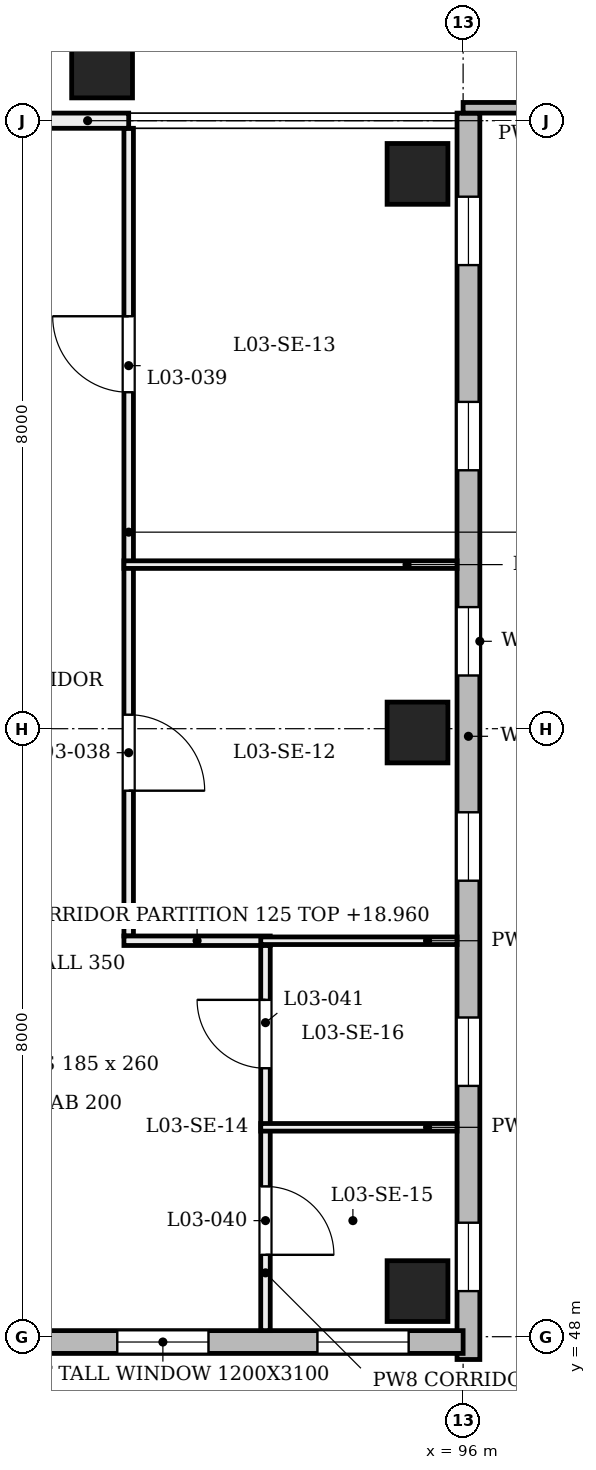
"""IFC4 building model, lengths in metres.
Left out: names, types, materials, properties, quantities, classifications, styles, units other than length and angle.
Written with IfcOpenShell. Run it as: python <this file> out.ifc"""

import sys

from ifc_helpers import new_model, si_unit, direction, frame, frame_2d, origin, origin_2d, place, context, subcontext, project, spatial, rectangle, extrude, element, fill, save


model = new_model("IFC4")
c1 = context("Model", 3, precision=1e-05, world=origin(), true_north=direction((0.0, 1.0)))
c2 = subcontext(c1, "Body", "Model", "MODEL_VIEW")
j1 = project(units=[si_unit("LENGTHUNIT", "METRE"), si_unit("PLANEANGLEUNIT", "RADIAN")], contexts=[c1])
p1 = place(None, origin())
s1 = spatial("IfcSite", under=j1, at=p1, CompositionType="ELEMENT")
p2 = place(p1, origin())
s2 = spatial("IfcBuilding", under=s1, at=p2, CompositionType="ELEMENT")
p3 = place(p2, frame((0.0, 0.0, 14.4)))
s3 = spatial("IfcBuildingStorey", under=s2, at=p3, CompositionType="ELEMENT", Elevation=14.4)
for number, where, z_axis, x_axis in (
    (1, (95.4, 48.6, 0.0), (0.0, 0.0, 1.0), (1.0, 0.0, 0.0)),
    (2, (95.4, 55.95, 0.0), (0.0, 0.0, 1.0), (1.0, 0.0, 0.0)),
    (3, (95.4, 63.3, 0.0), (0.0, 0.0, 1.0), (1.0, 0.0, 0.0)),
):
    element("IfcColumn", number, at=place(p3, frame(where, z_axis=z_axis, x_axis=x_axis)), inside=s3, PredefinedType="COLUMN", context=c2, shape_type="SweptSolid", body=[
        extrude(rectangle(XDim=0.8, YDim=0.8, at=origin_2d()), origin(), (0.0, 0.0, 1.0), 4.8),
    ])
p4 = place(p3, frame((91.0, 64.7, 0.0), z_axis=(0.203952265704, 0.0, 0.978980833987), x_axis=(0.0, 1.0, 0.0)))
e4 = element("IfcColumn", 4, at=p4, inside=s3, PredefinedType="COLUMN", context=c2, shape_type="SweptSolid", body=[
    extrude(rectangle(XDim=0.8, YDim=0.8, at=origin_2d()), origin(), (0.0, 0.0, 1.0), 4.903),
])
p5 = place(p3, frame((96.07, 47.7, 0.0), z_axis=(0.0, 0.0, 1.0), x_axis=(0.0, 1.0, 0.0)))
e5 = element("IfcWall", 5, at=p5, inside=s3, PredefinedType="SOLIDWALL", context=c2, shape_type="SweptSolid", body=[
    extrude(rectangle(XDim=16.4, YDim=0.3, at=frame_2d((8.2, 0.0))), origin(), (0.0, 0.0, 1.0), 3.9),
])
p6 = place(p5, frame((0.9, 0.0, 0.75)))
e6 = element("IfcOpeningElement", 6, at=p6, cuts=e5, PredefinedType="OPENING", context=c2, shape_type="SweptSolid", body=[
    extrude(rectangle(XDim=0.9, YDim=3.1, at=frame_2d((0.45, 1.55))), frame((0.0, 0.16, 0.0), z_axis=(0.0, -1.0, 0.0), x_axis=(1.0, 0.0, 0.0)), (0.0, 0.0, 1.0), 0.32),
])
p7 = place(p5, frame((3.6, 0.0, 0.75)))
e7 = element("IfcOpeningElement", 7, at=p7, cuts=e5, PredefinedType="OPENING", context=c2, shape_type="SweptSolid", body=[
    extrude(rectangle(XDim=0.9, YDim=3.1, at=frame_2d((0.45, 1.55))), frame((0.0, 0.16, 0.0), z_axis=(0.0, -1.0, 0.0), x_axis=(1.0, 0.0, 0.0)), (0.0, 0.0, 1.0), 0.32),
])
p8 = place(p5, frame((6.3, 0.0, 0.75)))
e8 = element("IfcOpeningElement", 8, at=p8, cuts=e5, PredefinedType="OPENING", context=c2, shape_type="SweptSolid", body=[
    extrude(rectangle(XDim=0.9, YDim=3.1, at=frame_2d((0.45, 1.55))), frame((0.0, 0.16, 0.0), z_axis=(0.0, -1.0, 0.0), x_axis=(1.0, 0.0, 0.0)), (0.0, 0.0, 1.0), 0.32),
])
p9 = place(p5, frame((9.0, 0.0, 0.75)))
e9 = element("IfcOpeningElement", 9, at=p9, cuts=e5, PredefinedType="OPENING", context=c2, shape_type="SweptSolid", body=[
    extrude(rectangle(XDim=0.9, YDim=3.1, at=frame_2d((0.45, 1.55))), frame((0.0, 0.16, 0.0), z_axis=(0.0, -1.0, 0.0), x_axis=(1.0, 0.0, 0.0)), (0.0, 0.0, 1.0), 0.32),
])
p10 = place(p5, frame((11.7, 0.0, 0.75)))
e10 = element("IfcOpeningElement", 10, at=p10, cuts=e5, PredefinedType="OPENING", context=c2, shape_type="SweptSolid", body=[
    extrude(rectangle(XDim=0.9, YDim=3.1, at=frame_2d((0.45, 1.55))), frame((0.0, 0.16, 0.0), z_axis=(0.0, -1.0, 0.0), x_axis=(1.0, 0.0, 0.0)), (0.0, 0.0, 1.0), 0.32),
])
p11 = place(p5, frame((14.4, 0.0, 0.75)))
e11 = element("IfcOpeningElement", 11, at=p11, cuts=e5, PredefinedType="OPENING", context=c2, shape_type="SweptSolid", body=[
    extrude(rectangle(XDim=0.9, YDim=3.1, at=frame_2d((0.45, 1.55))), frame((0.0, 0.16, 0.0), z_axis=(0.0, -1.0, 0.0), x_axis=(1.0, 0.0, 0.0)), (0.0, 0.0, 1.0), 0.32),
])
p12 = place(p3, frame((88.1, 47.93, 0.0), z_axis=(0.0, 0.0, 1.0), x_axis=(1.0, 0.0, 0.0)))
e12 = element("IfcWall", 12, at=p12, inside=s3, PredefinedType="SOLIDWALL", context=c2, shape_type="SweptSolid", body=[
    extrude(rectangle(XDim=7.9, YDim=0.3, at=frame_2d((3.95, 0.0))), origin(), (0.0, 0.0, 1.0), 3.9),
])
p13 = place(p12, frame((0.717, 0.0, 0.75)))
e13 = element("IfcOpeningElement", 13, at=p13, cuts=e12, PredefinedType="OPENING", context=c2, shape_type="SweptSolid", body=[
    extrude(rectangle(XDim=1.2, YDim=3.1, at=frame_2d((0.6, 1.55))), frame((0.0, 0.16, 0.0), z_axis=(0.0, -1.0, 0.0), x_axis=(1.0, 0.0, 0.0)), (0.0, 0.0, 1.0), 0.32),
])
p14 = place(p12, frame((3.35, 0.0, 0.75)))
e14 = element("IfcOpeningElement", 14, at=p14, cuts=e12, PredefinedType="OPENING", context=c2, shape_type="SweptSolid", body=[
    extrude(rectangle(XDim=1.2, YDim=3.1, at=frame_2d((0.6, 1.55))), frame((0.0, 0.16, 0.0), z_axis=(0.0, -1.0, 0.0), x_axis=(1.0, 0.0, 0.0)), (0.0, 0.0, 1.0), 0.32),
])
p15 = place(p12, frame((5.983, 0.0, 0.75)))
e15 = element("IfcOpeningElement", 15, at=p15, cuts=e12, PredefinedType="OPENING", context=c2, shape_type="SweptSolid", body=[
    extrude(rectangle(XDim=1.2, YDim=3.1, at=frame_2d((0.6, 1.55))), frame((0.0, 0.16, 0.0), z_axis=(0.0, -1.0, 0.0), x_axis=(1.0, 0.0, 0.0)), (0.0, 0.0, 1.0), 0.32),
])
p16 = place(p3, frame((96.0, 64.17, 0.0), z_axis=(0.0, 0.0, 1.0), x_axis=(1.0, 0.0, 0.0)))
e16 = element("IfcWall", 16, at=p16, inside=s3, PredefinedType="SOLIDWALL", context=c2, shape_type="SweptSolid", body=[
    extrude(rectangle(XDim=3.0, YDim=0.14, at=frame_2d((1.5, 0.0))), origin(), (0.0, 0.0, 1.0), 3.9),
])
p17 = place(p3, frame((91.6, 53.272, 0.0), z_axis=(0.0, 0.0, 1.0), x_axis=(0.0, 1.0, 0.0)))
e17 = element("IfcWall", 17, at=p17, inside=s3, PredefinedType="PARTITIONING", context=c2, shape_type="SweptSolid", body=[
    extrude(rectangle(XDim=10.628, YDim=0.125, at=frame_2d((5.314, 0.0))), origin(), (0.0, 0.0, 1.0), 3.88),
])
p18 = place(p17, frame((1.912, 0.0, 0.0)))
e18 = element("IfcOpeningElement", 18, at=p18, cuts=e17, PredefinedType="OPENING", context=c2, shape_type="SweptSolid", body=[
    extrude(rectangle(XDim=1.0, YDim=2.1, at=frame_2d((0.5, 1.05))), frame((0.0, 0.073, 0.0), z_axis=(0.0, -1.0, 0.0), x_axis=(1.0, 0.0, 0.0)), (0.0, 0.0, 1.0), 0.145),
])
p19 = place(p17, frame((7.155, 0.0, 0.0)))
e19 = element("IfcOpeningElement", 19, at=p19, cuts=e17, PredefinedType="OPENING", context=c2, shape_type="SweptSolid", body=[
    extrude(rectangle(XDim=1.0, YDim=2.1, at=frame_2d((0.5, 1.05))), frame((0.0, 0.073, 0.0), z_axis=(0.0, -1.0, 0.0), x_axis=(1.0, 0.0, 0.0)), (0.0, 0.0, 1.0), 0.145),
])
p20 = place(p3, frame((91.538, 53.21, 0.0), z_axis=(0.0, 0.0, 1.0), x_axis=(1.0, 0.0, 0.0)))
e20 = element("IfcWall", 20, at=p20, inside=s3, PredefinedType="PARTITIONING", context=c2, shape_type="SweptSolid", body=[
    extrude(rectangle(XDim=1.925, YDim=0.125, at=frame_2d((0.962, 0.0))), origin(), (0.0, 0.0, 1.0), 4.56),
])
p21 = place(p3, frame((93.337, 53.21, 0.0), z_axis=(0.0, 0.0, 1.0), x_axis=(1.0, 0.0, 0.0)))
e21 = element("IfcWall", 21, at=p21, inside=s3, PredefinedType="PARTITIONING", context=c2, shape_type="SweptSolid", body=[
    extrude(rectangle(XDim=2.583, YDim=0.1, at=frame_2d((1.291, 0.0))), origin(), (0.0, 0.0, 1.0), 3.88),
])
p22 = place(p3, frame((91.538, 58.159, 0.0), z_axis=(0.0, 0.0, 1.0), x_axis=(1.0, 0.0, 0.0)))
e22 = element("IfcWall", 22, at=p22, inside=s3, PredefinedType="PARTITIONING", context=c2, shape_type="SweptSolid", body=[
    extrude(rectangle(XDim=4.382, YDim=0.1, at=frame_2d((2.191, 0.0))), origin(), (0.0, 0.0, 1.0), 3.88),
])
p23 = place(p3, frame((93.4, 48.08, 0.0), z_axis=(0.0, 0.0, 1.0), x_axis=(0.0, 1.0, 0.0)))
e23 = element("IfcWall", 23, at=p23, inside=s3, PredefinedType="PARTITIONING", context=c2, shape_type="SweptSolid", body=[
    extrude(rectangle(XDim=5.067, YDim=0.125, at=frame_2d((2.534, 0.0))), origin(), (0.0, 0.0, 1.0), 3.88),
])
p24 = place(p23, frame((0.997, 0.0, 0.0)))
e24 = element("IfcOpeningElement", 24, at=p24, cuts=e23, PredefinedType="OPENING", context=c2, shape_type="SweptSolid", body=[
    extrude(rectangle(XDim=0.9, YDim=2.1, at=frame_2d((0.45, 1.05))), frame((0.0, 0.073, 0.0), z_axis=(0.0, -1.0, 0.0), x_axis=(1.0, 0.0, 0.0)), (0.0, 0.0, 1.0), 0.145),
])
p25 = place(p23, frame((3.452, 0.0, 0.0)))
e25 = element("IfcOpeningElement", 25, at=p25, cuts=e23, PredefinedType="OPENING", context=c2, shape_type="SweptSolid", body=[
    extrude(rectangle(XDim=0.9, YDim=2.1, at=frame_2d((0.45, 1.05))), frame((0.0, 0.073, 0.0), z_axis=(0.0, -1.0, 0.0), x_axis=(1.0, 0.0, 0.0)), (0.0, 0.0, 1.0), 0.145),
])
p26 = place(p3, frame((93.337, 50.755, 0.0), z_axis=(0.0, 0.0, 1.0), x_axis=(1.0, 0.0, 0.0)))
e26 = element("IfcWall", 26, at=p26, inside=s3, PredefinedType="PARTITIONING", context=c2, shape_type="SweptSolid", body=[
    extrude(rectangle(XDim=2.583, YDim=0.1, at=frame_2d((1.291, 0.0))), origin(), (0.0, 0.0, 1.0), 3.88),
])
p27 = place(p3, frame((88.0, 64.0, 0.0), z_axis=(0.0, 0.0, 1.0), x_axis=(1.0, 0.0, 0.0)))
e27 = element("IfcWall", 27, at=p27, inside=s3, PredefinedType="PARTITIONING", context=c2, shape_type="SweptSolid", body=[
    extrude(rectangle(XDim=3.6, YDim=0.2, at=frame_2d((1.8, 0.0))), origin(), (0.0, 0.0, 1.0), 3.88),
])
p28 = place(p27, frame((1.3, 0.0, 0.0)))
e28 = element("IfcOpeningElement", 28, at=p28, cuts=e27, PredefinedType="OPENING", context=c2, shape_type="SweptSolid", body=[
    extrude(rectangle(XDim=1.0, YDim=2.1, at=frame_2d((0.5, 1.05))), frame((0.0, 0.11, 0.0), z_axis=(0.0, -1.0, 0.0), x_axis=(1.0, 0.0, 0.0)), (0.0, 0.0, 1.0), 0.22),
])
p29 = place(p6, origin())
e29 = element("IfcWindow", 29, at=p29, inside=s3, PartitioningType="SINGLE_PANEL", PredefinedType="WINDOW", context=c2, shape_type="SweptSolid", body=[
    extrude(rectangle(XDim=0.9, YDim=3.1, at=frame_2d((0.45, 1.55))), frame((0.0, 0.03, 0.0), z_axis=(0.0, -1.0, 0.0), x_axis=(1.0, 0.0, 0.0)), (0.0, 0.0, 1.0), 0.06),
])
fill(e6, e29)
p30 = place(p7, origin())
e30 = element("IfcWindow", 30, at=p30, inside=s3, PartitioningType="SINGLE_PANEL", PredefinedType="WINDOW", context=c2, shape_type="SweptSolid", body=[
    extrude(rectangle(XDim=0.9, YDim=3.1, at=frame_2d((0.45, 1.55))), frame((0.0, 0.03, 0.0), z_axis=(0.0, -1.0, 0.0), x_axis=(1.0, 0.0, 0.0)), (0.0, 0.0, 1.0), 0.06),
])
fill(e7, e30)
p31 = place(p8, origin())
e31 = element("IfcWindow", 31, at=p31, inside=s3, PartitioningType="SINGLE_PANEL", PredefinedType="WINDOW", context=c2, shape_type="SweptSolid", body=[
    extrude(rectangle(XDim=0.9, YDim=3.1, at=frame_2d((0.45, 1.55))), frame((0.0, 0.03, 0.0), z_axis=(0.0, -1.0, 0.0), x_axis=(1.0, 0.0, 0.0)), (0.0, 0.0, 1.0), 0.06),
])
fill(e8, e31)
p32 = place(p9, origin())
e32 = element("IfcWindow", 32, at=p32, inside=s3, PartitioningType="SINGLE_PANEL", PredefinedType="WINDOW", context=c2, shape_type="SweptSolid", body=[
    extrude(rectangle(XDim=0.9, YDim=3.1, at=frame_2d((0.45, 1.55))), frame((0.0, 0.03, 0.0), z_axis=(0.0, -1.0, 0.0), x_axis=(1.0, 0.0, 0.0)), (0.0, 0.0, 1.0), 0.06),
])
fill(e9, e32)
p33 = place(p10, origin())
e33 = element("IfcWindow", 33, at=p33, inside=s3, PartitioningType="SINGLE_PANEL", PredefinedType="WINDOW", context=c2, shape_type="SweptSolid", body=[
    extrude(rectangle(XDim=0.9, YDim=3.1, at=frame_2d((0.45, 1.55))), frame((0.0, 0.03, 0.0), z_axis=(0.0, -1.0, 0.0), x_axis=(1.0, 0.0, 0.0)), (0.0, 0.0, 1.0), 0.06),
])
fill(e10, e33)
p34 = place(p11, origin())
e34 = element("IfcWindow", 34, at=p34, inside=s3, PartitioningType="SINGLE_PANEL", PredefinedType="WINDOW", context=c2, shape_type="SweptSolid", body=[
    extrude(rectangle(XDim=0.9, YDim=3.1, at=frame_2d((0.45, 1.55))), frame((0.0, 0.03, 0.0), z_axis=(0.0, -1.0, 0.0), x_axis=(1.0, 0.0, 0.0)), (0.0, 0.0, 1.0), 0.06),
])
fill(e11, e34)
p35 = place(p14, origin())
e35 = element("IfcWindow", 35, at=p35, inside=s3, PartitioningType="SINGLE_PANEL", PredefinedType="WINDOW", context=c2, shape_type="SweptSolid", body=[
    extrude(rectangle(XDim=1.2, YDim=3.1, at=frame_2d((0.6, 1.55))), frame((0.0, 0.03, 0.0), z_axis=(0.0, -1.0, 0.0), x_axis=(1.0, 0.0, 0.0)), (0.0, 0.0, 1.0), 0.06),
])
fill(e14, e35)
p36 = place(p15, origin())
e36 = element("IfcWindow", 36, at=p36, inside=s3, PartitioningType="SINGLE_PANEL", PredefinedType="WINDOW", context=c2, shape_type="SweptSolid", body=[
    extrude(rectangle(XDim=1.2, YDim=3.1, at=frame_2d((0.6, 1.55))), frame((0.0, 0.03, 0.0), z_axis=(0.0, -1.0, 0.0), x_axis=(1.0, 0.0, 0.0)), (0.0, 0.0, 1.0), 0.06),
])
fill(e15, e36)
p37 = place(p18, frame((1.0, 0.0, 0.0), z_axis=(0.0, 0.0, 1.0), x_axis=(-1.0, 0.0, 0.0)))
e37 = element("IfcDoor", 37, at=p37, inside=s3, OperationType="SINGLE_SWING_LEFT", PredefinedType="DOOR", context=c2, shape_type="SweptSolid", body=[
    extrude(rectangle(XDim=1.0, YDim=2.1, at=frame_2d((0.5, 1.05))), frame((0.0, 0.025, 0.0), z_axis=(0.0, -1.0, 0.0), x_axis=(1.0, 0.0, 0.0)), (0.0, 0.0, 1.0), 0.05),
])
fill(e18, e37)
p38 = place(p19, frame((1.0, 0.0, 0.0), z_axis=(0.0, 0.0, 1.0), x_axis=(-1.0, 0.0, 0.0)))
e38 = element("IfcDoor", 38, at=p38, inside=s3, OperationType="SINGLE_SWING_RIGHT", PredefinedType="DOOR", context=c2, shape_type="SweptSolid", body=[
    extrude(rectangle(XDim=1.0, YDim=2.1, at=frame_2d((0.5, 1.05))), frame((0.0, 0.025, 0.0), z_axis=(0.0, -1.0, 0.0), x_axis=(1.0, 0.0, 0.0)), (0.0, 0.0, 1.0), 0.05),
])
fill(e19, e38)
p39 = place(p24, frame((0.9, 0.0, 0.0), z_axis=(0.0, 0.0, 1.0), x_axis=(-1.0, 0.0, 0.0)))
e39 = element("IfcDoor", 39, at=p39, inside=s3, OperationType="SINGLE_SWING_LEFT", PredefinedType="DOOR", context=c2, shape_type="SweptSolid", body=[
    extrude(rectangle(XDim=0.9, YDim=2.1, at=frame_2d((0.45, 1.05))), frame((0.0, 0.025, 0.0), z_axis=(0.0, -1.0, 0.0), x_axis=(1.0, 0.0, 0.0)), (0.0, 0.0, 1.0), 0.05),
])
fill(e24, e39)
p40 = place(p25, frame((0.9, 0.0, 0.0), z_axis=(0.0, 0.0, 1.0), x_axis=(-1.0, 0.0, 0.0)))
e40 = element("IfcDoor", 40, at=p40, inside=s3, OperationType="SINGLE_SWING_RIGHT", PredefinedType="DOOR", context=c2, shape_type="SweptSolid", body=[
    extrude(rectangle(XDim=0.9, YDim=2.1, at=frame_2d((0.45, 1.05))), frame((0.0, 0.025, 0.0), z_axis=(0.0, -1.0, 0.0), x_axis=(1.0, 0.0, 0.0)), (0.0, 0.0, 1.0), 0.05),
])
fill(e25, e40)
save(model, sys.argv[1])
